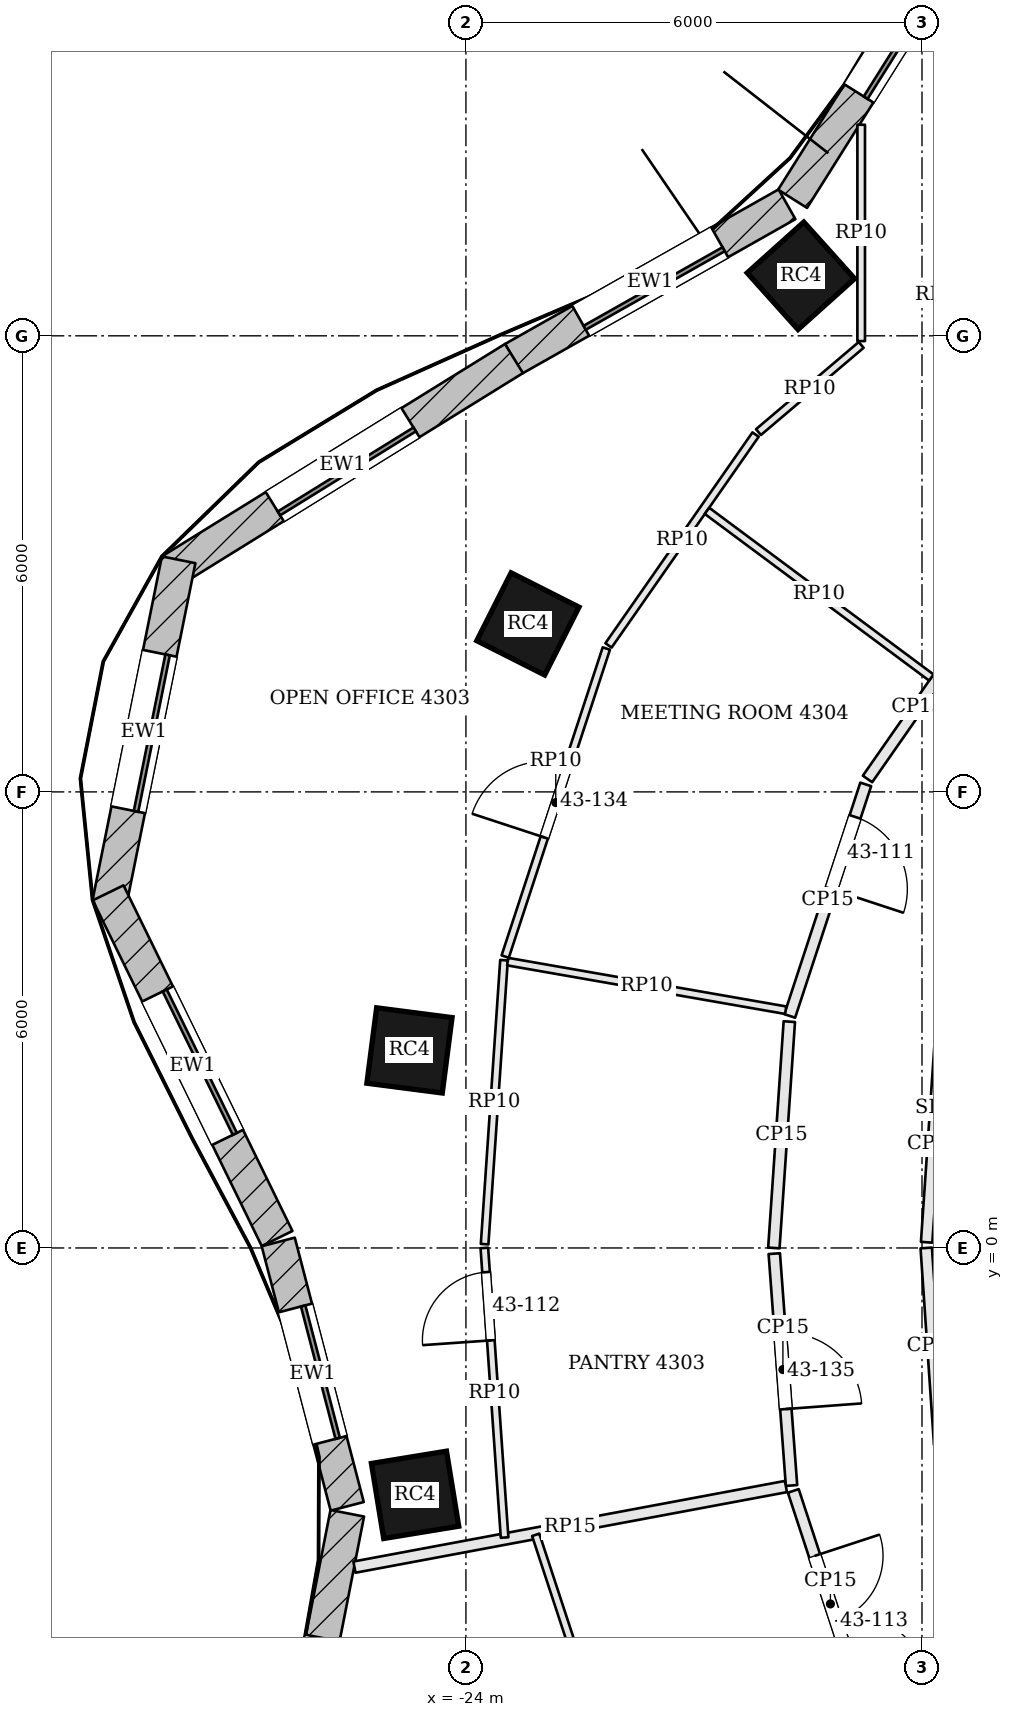
"""IFC4 building model, lengths in metres.
Left out: names, types, materials, properties, quantities, classifications, styles, units other than length and angle.
Written with IfcOpenShell. Run it as: python <this file> out.ifc"""

import sys

from ifc_helpers import new_model, si_unit, direction, frame, frame_2d, origin, origin_2d, place, context, subcontext, project, spatial, rectangle, extrude, element, fill, save


model = new_model("IFC4")
c1 = context("Model", 3, precision=1e-05, world=origin(), true_north=direction((0.0, 1.0)))
c2 = subcontext(c1, "Body", "Model", "MODEL_VIEW")
j1 = project(units=[si_unit("LENGTHUNIT", "METRE"), si_unit("PLANEANGLEUNIT", "RADIAN")], contexts=[c1])
p1 = place(None, origin())
s1 = spatial("IfcSite", under=j1, at=p1, CompositionType="ELEMENT")
p2 = place(p1, origin())
s2 = spatial("IfcBuilding", under=s1, at=p2, CompositionType="ELEMENT")
p3 = place(p2, frame((0.0, 0.0, 177.9)))
s3 = spatial("IfcBuildingStorey", under=s2, at=p3, CompositionType="ELEMENT", Elevation=177.9)
for number, where, z_axis, x_axis in (
    (1, (-19.593, 12.79, 0.0), (0.0, 0.0, 1.0), (-0.744, -0.668, 0.0)),
    (2, (-23.185, 8.21, 0.0), (0.0, 0.0, 1.0), (-0.451, -0.893, 0.0)),
    (3, (-24.743, 2.599, 0.0), (0.0, 0.0, 1.0), (-0.128, -0.992, 0.0)),
    (4, (-24.669, -3.248, 0.0), (0.0, 0.0, 1.0), (0.162, -0.987, 0.0)),
):
    element("IfcColumn", number, at=place(p3, frame(where, z_axis=z_axis, x_axis=x_axis)), inside=s3, PredefinedType="COLUMN", context=c2, shape_type="SweptSolid", body=[
        extrude(rectangle(XDim=1.0, YDim=1.0, at=origin_2d()), origin(), (0.0, 0.0, 1.0), 3.9),
    ])
p4 = place(p3, frame((-16.998, 18.099, 0.0), z_axis=(0.0, 0.0, 1.0), x_axis=(-0.532745661304, -0.846275404559, 0.0)))
e5 = element("IfcWall", 5, at=p4, inside=s3, PredefinedType="SOLIDWALL", context=c2, shape_type="SweptSolid", body=[
    extrude(rectangle(XDim=5.076, YDim=0.45, at=frame_2d((2.538, 0.0))), origin(), (0.0, 0.0, 1.0), 3.7),
])
p5 = place(p4, frame((1.638, 0.0, 0.9)))
e6 = element("IfcOpeningElement", 6, at=p5, cuts=e5, PredefinedType="OPENING", context=c2, shape_type="SweptSolid", body=[
    extrude(rectangle(XDim=1.8, YDim=2.3, at=frame_2d((0.9, 1.15))), frame((0.0, 0.235, 0.0), z_axis=(0.0, -1.0, 0.0), x_axis=(1.0, 0.0, 0.0)), (0.0, 0.0, 1.0), 0.47),
])
p6 = place(p3, frame((-19.776, 13.731, 0.0), z_axis=(0.0, 0.0, 1.0), x_axis=(-0.870610133829, -0.491973571318, 0.0)))
e7 = element("IfcWall", 7, at=p6, inside=s3, PredefinedType="SOLIDWALL", context=c2, shape_type="SweptSolid", body=[
    extrude(rectangle(XDim=4.134, YDim=0.45, at=frame_2d((2.067, 0.0))), origin(), (0.0, 0.0, 1.0), 3.7),
])
p7 = place(p6, frame((1.017, 0.0, 0.9)))
e8 = element("IfcOpeningElement", 8, at=p7, cuts=e7, PredefinedType="OPENING", context=c2, shape_type="SweptSolid", body=[
    extrude(rectangle(XDim=2.1, YDim=2.3, at=frame_2d((1.05, 1.15))), frame((0.0, 0.235, 0.0), z_axis=(0.0, -1.0, 0.0), x_axis=(1.0, 0.0, 0.0)), (0.0, 0.0, 1.0), 0.47),
])
p8 = place(p3, frame((-23.368, 11.701, 0.0), z_axis=(0.0, 0.0, 1.0), x_axis=(-0.850251408633, -0.526376806211, 0.0)))
e9 = element("IfcWall", 9, at=p8, inside=s3, PredefinedType="SOLIDWALL", context=c2, shape_type="SweptSolid", body=[
    extrude(rectangle(XDim=5.302, YDim=0.45, at=frame_2d((2.651, 0.0))), origin(), (0.0, 0.0, 1.0), 3.7),
])
p9 = place(p8, frame((1.601, 0.0, 0.9)))
e10 = element("IfcOpeningElement", 10, at=p9, cuts=e9, PredefinedType="OPENING", context=c2, shape_type="SweptSolid", body=[
    extrude(rectangle(XDim=2.1, YDim=2.3, at=frame_2d((1.05, 1.15))), frame((0.0, 0.235, 0.0), z_axis=(0.0, -1.0, 0.0), x_axis=(1.0, 0.0, 0.0)), (0.0, 0.0, 1.0), 0.47),
])
p10 = place(p3, frame((-27.78, 9.053, 0.0), z_axis=(0.0, 0.0, 1.0), x_axis=(-0.197796229105, -0.980243159503, 0.0)))
e11 = element("IfcWall", 11, at=p10, inside=s3, PredefinedType="SOLIDWALL", context=c2, shape_type="SweptSolid", body=[
    extrude(rectangle(XDim=4.61, YDim=0.45, at=frame_2d((2.305, 0.0))), origin(), (0.0, 0.0, 1.0), 3.7),
])
p11 = place(p10, frame((1.255, 0.0, 0.9)))
e12 = element("IfcOpeningElement", 12, at=p11, cuts=e11, PredefinedType="OPENING", context=c2, shape_type="SweptSolid", body=[
    extrude(rectangle(XDim=2.1, YDim=2.3, at=frame_2d((1.05, 1.15))), frame((0.0, 0.235, 0.0), z_axis=(0.0, -1.0, 0.0), x_axis=(1.0, 0.0, 0.0)), (0.0, 0.0, 1.0), 0.47),
])
p12 = place(p3, frame((-28.707, 4.672, 0.0), z_axis=(0.0, 0.0, 1.0), x_axis=(0.439053549989, -0.898460895221, 0.0)))
e13 = element("IfcWall", 13, at=p12, inside=s3, PredefinedType="SOLIDWALL", context=c2, shape_type="SweptSolid", body=[
    extrude(rectangle(XDim=5.062, YDim=0.45, at=frame_2d((2.531, 0.0))), origin(), (0.0, 0.0, 1.0), 3.7),
])
p13 = place(p12, frame((1.481, 0.0, 0.9)))
e14 = element("IfcOpeningElement", 14, at=p13, cuts=e13, PredefinedType="OPENING", context=c2, shape_type="SweptSolid", body=[
    extrude(rectangle(XDim=2.1, YDim=2.3, at=frame_2d((1.05, 1.15))), frame((0.0, 0.235, 0.0), z_axis=(0.0, -1.0, 0.0), x_axis=(1.0, 0.0, 0.0)), (0.0, 0.0, 1.0), 0.47),
])
p14 = place(p3, frame((-26.469, 0.079, 0.0), z_axis=(0.0, 0.0, 1.0), x_axis=(0.252446779859, -0.967610780913, 0.0)))
e15 = element("IfcWall", 15, at=p14, inside=s3, PredefinedType="SOLIDWALL", context=c2, shape_type="SweptSolid", body=[
    extrude(rectangle(XDim=3.595, YDim=0.45, at=frame_2d((1.797, 0.0))), origin(), (0.0, 0.0, 1.0), 3.7),
])
p15 = place(p14, frame((0.897, 0.0, 0.9)))
e16 = element("IfcOpeningElement", 16, at=p15, cuts=e15, PredefinedType="OPENING", context=c2, shape_type="SweptSolid", body=[
    extrude(rectangle(XDim=1.8, YDim=2.3, at=frame_2d((0.9, 1.15))), frame((0.0, 0.235, 0.0), z_axis=(0.0, -1.0, 0.0), x_axis=(1.0, 0.0, 0.0)), (0.0, 0.0, 1.0), 0.47),
])
p16 = place(p3, frame((-25.561, -3.49, 0.0), z_axis=(0.0, 0.0, 1.0), x_axis=(-0.192494026297, -0.981298145234, 0.0)))
e17 = element("IfcWall", 17, at=p16, inside=s3, PredefinedType="SOLIDWALL", context=c2, shape_type="SweptSolid", body=[
    extrude(rectangle(XDim=5.446, YDim=0.45, at=frame_2d((2.723, 0.0))), origin(), (0.0, 0.0, 1.0), 3.7),
])
p17 = place(p16, frame((1.673, 0.0, 0.9)))
e18 = element("IfcOpeningElement", 18, at=p17, cuts=e17, PredefinedType="OPENING", context=c2, shape_type="SweptSolid", body=[
    extrude(rectangle(XDim=2.1, YDim=2.3, at=frame_2d((1.05, 1.15))), frame((0.0, 0.235, 0.0), z_axis=(0.0, -1.0, 0.0), x_axis=(1.0, 0.0, 0.0)), (0.0, 0.0, 1.0), 0.47),
])
p18 = place(p3, frame((-17.397, 8.062, 0.0), z_axis=(0.0, 0.0, 1.0), x_axis=(-0.572118665737, -0.820170855563, 0.0)))
e19 = element("IfcWall", 19, at=p18, inside=s3, PredefinedType="PARTITIONING", context=c2, shape_type="SweptSolid", body=[
    extrude(rectangle(XDim=2.306, YDim=0.15, at=frame_2d((1.153, 0.0))), origin(), (0.0, 0.0, 1.0), 3.084),
])
p19 = place(p3, frame((-18.74, 6.099, 0.0), z_axis=(0.0, 0.0, 1.0), x_axis=(-0.31188427026, -0.950120098706, 0.0)))
e20 = element("IfcWall", 20, at=p19, inside=s3, PredefinedType="PARTITIONING", context=c2, shape_type="SweptSolid", body=[
    extrude(rectangle(XDim=3.206, YDim=0.15, at=frame_2d((1.603, 0.0))), origin(), (0.0, 0.0, 1.0), 3.084),
])
p20 = place(p19, frame((0.45, 0.0, 0.0)))
e21 = element("IfcOpeningElement", 21, at=p20, cuts=e20, PredefinedType="OPENING", context=c2, shape_type="SweptSolid", body=[
    extrude(rectangle(XDim=1.0, YDim=2.4, at=frame_2d((0.5, 1.2))), frame((0.0, 0.085, 0.0), z_axis=(0.0, -1.0, 0.0), x_axis=(1.0, 0.0, 0.0)), (0.0, 0.0, 1.0), 0.17),
])
p21 = place(p3, frame((-19.745, 2.978, 0.0), z_axis=(0.0, 0.0, 1.0), x_axis=(-0.068142324, -0.997675610447, 0.0)))
e22 = element("IfcWall", 22, at=p21, inside=s3, PredefinedType="PARTITIONING", context=c2, shape_type="SweptSolid", body=[
    extrude(rectangle(XDim=2.984, YDim=0.15, at=frame_2d((1.492, 0.0))), origin(), (0.0, 0.0, 1.0), 3.084),
])
p22 = place(p3, frame((-19.943, -0.075, 0.0), z_axis=(0.0, 0.0, 1.0), x_axis=(0.074071611523, -0.997252924973, 0.0)))
e23 = element("IfcWall", 23, at=p22, inside=s3, PredefinedType="PARTITIONING", context=c2, shape_type="SweptSolid", body=[
    extrude(rectangle(XDim=3.059, YDim=0.15, at=frame_2d((1.529, 0.0))), origin(), (0.0, 0.0, 1.0), 3.084),
])
p23 = place(p22, frame((1.05, 0.0, 0.0)))
e24 = element("IfcOpeningElement", 24, at=p23, cuts=e23, PredefinedType="OPENING", context=c2, shape_type="SweptSolid", body=[
    extrude(rectangle(XDim=1.0, YDim=2.1, at=frame_2d((0.5, 1.05))), frame((0.0, 0.085, 0.0), z_axis=(0.0, -1.0, 0.0), x_axis=(1.0, 0.0, 0.0)), (0.0, 0.0, 1.0), 0.17),
])
p24 = place(p3, frame((-25.467, -4.199, 0.0), z_axis=(0.0, 0.0, 1.0), x_axis=(0.982998787258, 0.183612048216, 0.0)))
e25 = element("IfcWall", 25, at=p24, inside=s3, PredefinedType="PARTITIONING", context=c2, shape_type="SweptSolid", body=[
    extrude(rectangle(XDim=5.775, YDim=0.15, at=frame_2d((2.887, 0.0))), origin(), (0.0, 0.0, 1.0), 3.234),
])
p25 = place(p3, frame((-19.693, -3.196, 0.0), z_axis=(0.0, 0.0, 1.0), x_axis=(0.311918951318, -0.950108713679, 0.0)))
e26 = element("IfcWall", 26, at=p25, inside=s3, PredefinedType="PARTITIONING", context=c2, shape_type="SweptSolid", body=[
    extrude(rectangle(XDim=3.13, YDim=0.15, at=frame_2d((1.565, 0.0))), origin(), (0.0, 0.0, 1.0), 3.084),
])
p26 = place(p25, frame((0.9, 0.0, 0.0)))
e27 = element("IfcOpeningElement", 27, at=p26, cuts=e26, PredefinedType="OPENING", context=c2, shape_type="SweptSolid", body=[
    extrude(rectangle(XDim=1.8, YDim=2.1, at=frame_2d((0.9, 1.05))), frame((0.0, 0.085, 0.0), z_axis=(0.0, -1.0, 0.0), x_axis=(1.0, 0.0, 0.0)), (0.0, 0.0, 1.0), 0.17),
])
p27 = place(p3, frame((-17.767, -2.592, 0.0), z_axis=(0.0, 0.0, 1.0), x_axis=(-0.068140828228, 0.997675712608, 0.0)))
e28 = element("IfcWall", 28, at=p27, inside=s3, PredefinedType="PARTITIONING", context=c2, shape_type="SweptSolid", body=[
    extrude(rectangle(XDim=2.598, YDim=0.15, at=frame_2d((1.299, 0.0))), origin(), (0.0, 0.0, 1.0), 3.084),
])
p28 = place(p3, frame((-17.939, 0.075, 0.0), z_axis=(0.0, 0.0, 1.0), x_axis=(0.068227980697, 0.997669756307, 0.0)))
e29 = element("IfcWall", 29, at=p28, inside=s3, PredefinedType="PARTITIONING", context=c2, shape_type="SweptSolid", body=[
    extrude(rectangle(XDim=2.598, YDim=0.15, at=frame_2d((1.299, 0.0))), origin(), (0.0, 0.0, 1.0), 3.084),
])
p29 = place(p3, frame((-23.491, -3.81, 0.0), z_axis=(0.0, 0.0, 1.0), x_axis=(-0.069811314636, 0.997560213896, 0.0)))
e30 = element("IfcWall", 30, at=p29, inside=s3, PredefinedType="PARTITIONING", context=c2, shape_type="SweptSolid", body=[
    extrude(rectangle(XDim=3.819, YDim=0.1, at=frame_2d((1.909, 0.0))), origin(), (0.0, 0.0, 1.0), 3.084),
])
p30 = place(p29, frame((2.6, 0.0, 0.0)))
e31 = element("IfcOpeningElement", 31, at=p30, cuts=e30, PredefinedType="OPENING", context=c2, shape_type="SweptSolid", body=[
    extrude(rectangle(XDim=0.9, YDim=2.1, at=frame_2d((0.45, 1.05))), frame((0.0, 0.06, 0.0), z_axis=(0.0, -1.0, 0.0), x_axis=(1.0, 0.0, 0.0)), (0.0, 0.0, 1.0), 0.12),
])
p31 = place(p3, frame((-23.754, 0.05, 0.0), z_axis=(0.0, 0.0, 1.0), x_axis=(0.068193493527, 0.997672114194, 0.0)))
e32 = element("IfcWall", 32, at=p31, inside=s3, PredefinedType="PARTITIONING", context=c2, shape_type="SweptSolid", body=[
    extrude(rectangle(XDim=3.745, YDim=0.1, at=frame_2d((1.873, 0.0))), origin(), (0.0, 0.0, 1.0), 3.084),
])
p32 = place(p3, frame((-23.483, 3.833, 0.0), z_axis=(0.0, 0.0, 1.0), x_axis=(0.311880220566, 0.95012142804, 0.0)))
e33 = element("IfcWall", 33, at=p32, inside=s3, PredefinedType="PARTITIONING", context=c2, shape_type="SweptSolid", body=[
    extrude(rectangle(XDim=4.265, YDim=0.1, at=frame_2d((2.133, 0.0))), origin(), (0.0, 0.0, 1.0), 3.084),
])
p33 = place(p32, frame((1.65, 0.0, 0.0)))
e34 = element("IfcOpeningElement", 34, at=p33, cuts=e33, PredefinedType="OPENING", context=c2, shape_type="SweptSolid", body=[
    extrude(rectangle(XDim=1.0, YDim=2.4, at=frame_2d((0.5, 1.2))), frame((0.0, 0.06, 0.0), z_axis=(0.0, -1.0, 0.0), x_axis=(1.0, 0.0, 0.0)), (0.0, 0.0, 1.0), 0.12),
])
p34 = place(p3, frame((-22.125, 7.927, 0.0), z_axis=(0.0, 0.0, 1.0), x_axis=(0.572100301866, 0.820183665166, 0.0)))
e35 = element("IfcWall", 35, at=p34, inside=s3, PredefinedType="PARTITIONING", context=c2, shape_type="SweptSolid", body=[
    extrude(rectangle(XDim=3.382, YDim=0.1, at=frame_2d((1.691, 0.0))), origin(), (0.0, 0.0, 1.0), 3.084),
])
p35 = place(p3, frame((-20.151, 10.734, 0.0), z_axis=(0.0, 0.0, 1.0), x_axis=(0.762465888028, 0.647028414827, 0.0)))
e36 = element("IfcWall", 36, at=p35, inside=s3, PredefinedType="PARTITIONING", context=c2, shape_type="SweptSolid", body=[
    extrude(rectangle(XDim=1.772, YDim=0.1, at=frame_2d((0.886, 0.0))), origin(), (0.0, 0.0, 1.0), 3.084),
])
p36 = place(p3, frame((-18.8, 11.93, 0.0), z_axis=(0.0, 0.0, 1.0), x_axis=(0.0, 1.0, 0.0)))
e37 = element("IfcWall", 37, at=p36, inside=s3, PredefinedType="PARTITIONING", context=c2, shape_type="SweptSolid", body=[
    extrude(rectangle(XDim=2.846, YDim=0.1, at=frame_2d((1.423, 0.0))), origin(), (0.0, 0.0, 1.0), 3.084),
])
p37 = place(p3, frame((-17.877, 7.505, 0.0), z_axis=(0.0, 0.0, 1.0), x_axis=(-0.802692989486, 0.596392458563, 0.0)))
e38 = element("IfcWall", 38, at=p37, inside=s3, PredefinedType="PARTITIONING", context=c2, shape_type="SweptSolid", body=[
    extrude(rectangle(XDim=3.677, YDim=0.1, at=frame_2d((1.838, 0.0))), origin(), (0.0, 0.0, 1.0), 3.084),
])
p38 = place(p3, frame((-19.794, 3.128, 0.0), z_axis=(0.0, 0.0, 1.0), x_axis=(-0.985065623684, 0.172179316518, 0.0)))
e39 = element("IfcWall", 39, at=p38, inside=s3, PredefinedType="PARTITIONING", context=c2, shape_type="SweptSolid", body=[
    extrude(rectangle(XDim=3.712, YDim=0.1, at=frame_2d((1.856, 0.0))), origin(), (0.0, 0.0, 1.0), 3.084),
])
p39 = place(p3, frame((-21.807, -7.658, 0.0), z_axis=(0.0, 0.0, 1.0), x_axis=(-0.311924580949, 0.950106865463, 0.0)))
e40 = element("IfcWall", 40, at=p39, inside=s3, PredefinedType="PARTITIONING", context=c2, shape_type="SweptSolid", body=[
    extrude(rectangle(XDim=4.088, YDim=0.1, at=frame_2d((2.044, 0.0))), origin(), (0.0, 0.0, 1.0), 3.084),
])
p40 = place(p39, frame((0.699, 0.0, 0.0)))
e41 = element("IfcOpeningElement", 41, at=p40, cuts=e40, PredefinedType="OPENING", context=c2, shape_type="SweptSolid", body=[
    extrude(rectangle(XDim=1.0, YDim=2.1, at=frame_2d((0.5, 1.05))), frame((0.0, 0.06, 0.0), z_axis=(0.0, -1.0, 0.0), x_axis=(1.0, 0.0, 0.0)), (0.0, 0.0, 1.0), 0.12),
])
p41 = place(p5, origin())
e42 = element("IfcWindow", 42, at=p41, inside=s3, PartitioningType="SINGLE_PANEL", PredefinedType="WINDOW", context=c2, shape_type="SweptSolid", body=[
    extrude(rectangle(XDim=1.8, YDim=2.3, at=frame_2d((0.9, 1.15))), frame((0.0, 0.135, 0.0), z_axis=(0.0, -1.0, 0.0), x_axis=(1.0, 0.0, 0.0)), (0.0, 0.0, 1.0), 0.06),
])
fill(e6, e42)
p42 = place(p7, origin())
e43 = element("IfcWindow", 43, at=p42, inside=s3, PartitioningType="SINGLE_PANEL", PredefinedType="WINDOW", context=c2, shape_type="SweptSolid", body=[
    extrude(rectangle(XDim=2.1, YDim=2.3, at=frame_2d((1.05, 1.15))), frame((0.0, 0.135, 0.0), z_axis=(0.0, -1.0, 0.0), x_axis=(1.0, 0.0, 0.0)), (0.0, 0.0, 1.0), 0.06),
])
fill(e8, e43)
p43 = place(p9, origin())
e44 = element("IfcWindow", 44, at=p43, inside=s3, PartitioningType="SINGLE_PANEL", PredefinedType="WINDOW", context=c2, shape_type="SweptSolid", body=[
    extrude(rectangle(XDim=2.1, YDim=2.3, at=frame_2d((1.05, 1.15))), frame((0.0, 0.135, 0.0), z_axis=(0.0, -1.0, 0.0), x_axis=(1.0, 0.0, 0.0)), (0.0, 0.0, 1.0), 0.06),
])
fill(e10, e44)
p44 = place(p11, origin())
e45 = element("IfcWindow", 45, at=p44, inside=s3, PartitioningType="SINGLE_PANEL", PredefinedType="WINDOW", context=c2, shape_type="SweptSolid", body=[
    extrude(rectangle(XDim=2.1, YDim=2.3, at=frame_2d((1.05, 1.15))), frame((0.0, 0.135, 0.0), z_axis=(0.0, -1.0, 0.0), x_axis=(1.0, 0.0, 0.0)), (0.0, 0.0, 1.0), 0.06),
])
fill(e12, e45)
p45 = place(p13, origin())
e46 = element("IfcWindow", 46, at=p45, inside=s3, PartitioningType="SINGLE_PANEL", PredefinedType="WINDOW", context=c2, shape_type="SweptSolid", body=[
    extrude(rectangle(XDim=2.1, YDim=2.3, at=frame_2d((1.05, 1.15))), frame((0.0, 0.135, 0.0), z_axis=(0.0, -1.0, 0.0), x_axis=(1.0, 0.0, 0.0)), (0.0, 0.0, 1.0), 0.06),
])
fill(e14, e46)
p46 = place(p15, origin())
e47 = element("IfcWindow", 47, at=p46, inside=s3, PartitioningType="SINGLE_PANEL", PredefinedType="WINDOW", context=c2, shape_type="SweptSolid", body=[
    extrude(rectangle(XDim=1.8, YDim=2.3, at=frame_2d((0.9, 1.15))), frame((0.0, 0.135, 0.0), z_axis=(0.0, -1.0, 0.0), x_axis=(1.0, 0.0, 0.0)), (0.0, 0.0, 1.0), 0.06),
])
fill(e16, e47)
p47 = place(p20, origin())
e48 = element("IfcDoor", 48, at=p47, inside=s3, OperationType="SINGLE_SWING_RIGHT", PredefinedType="DOOR", context=c2, shape_type="SweptSolid", body=[
    extrude(rectangle(XDim=1.0, YDim=2.4, at=frame_2d((0.5, 1.2))), frame((0.0, 0.025, 0.0), z_axis=(0.0, -1.0, 0.0), x_axis=(1.0, 0.0, 0.0)), (0.0, 0.0, 1.0), 0.05),
])
fill(e21, e48)
p48 = place(p30, origin())
e49 = element("IfcDoor", 49, at=p48, inside=s3, OperationType="SINGLE_SWING_LEFT", PredefinedType="DOOR", context=c2, shape_type="SweptSolid", body=[
    extrude(rectangle(XDim=0.9, YDim=2.1, at=frame_2d((0.45, 1.05))), frame((0.0, 0.025, 0.0), z_axis=(0.0, -1.0, 0.0), x_axis=(1.0, 0.0, 0.0)), (0.0, 0.0, 1.0), 0.05),
])
fill(e31, e49)
p49 = place(p26, origin())
e50 = element("IfcDoor", 50, at=p49, inside=s3, OperationType="DOUBLE_DOOR_SINGLE_SWING", PredefinedType="DOOR", context=c2, shape_type="SweptSolid", body=[
    extrude(rectangle(XDim=1.8, YDim=2.1, at=frame_2d((0.9, 1.05))), frame((0.0, 0.025, 0.0), z_axis=(0.0, -1.0, 0.0), x_axis=(1.0, 0.0, 0.0)), (0.0, 0.0, 1.0), 0.05),
])
fill(e27, e50)
p50 = place(p33, origin())
e51 = element("IfcDoor", 51, at=p50, inside=s3, OperationType="SINGLE_SWING_LEFT", PredefinedType="DOOR", context=c2, shape_type="SweptSolid", body=[
    extrude(rectangle(XDim=1.0, YDim=2.4, at=frame_2d((0.5, 1.2))), frame((0.0, 0.025, 0.0), z_axis=(0.0, -1.0, 0.0), x_axis=(1.0, 0.0, 0.0)), (0.0, 0.0, 1.0), 0.05),
])
fill(e34, e51)
p51 = place(p23, origin())
e52 = element("IfcDoor", 52, at=p51, inside=s3, OperationType="SINGLE_SWING_RIGHT", PredefinedType="DOOR", context=c2, shape_type="SweptSolid", body=[
    extrude(rectangle(XDim=1.0, YDim=2.1, at=frame_2d((0.5, 1.05))), frame((0.0, 0.025, 0.0), z_axis=(0.0, -1.0, 0.0), x_axis=(1.0, 0.0, 0.0)), (0.0, 0.0, 1.0), 0.05),
])
fill(e24, e52)
save(model, sys.argv[1])
